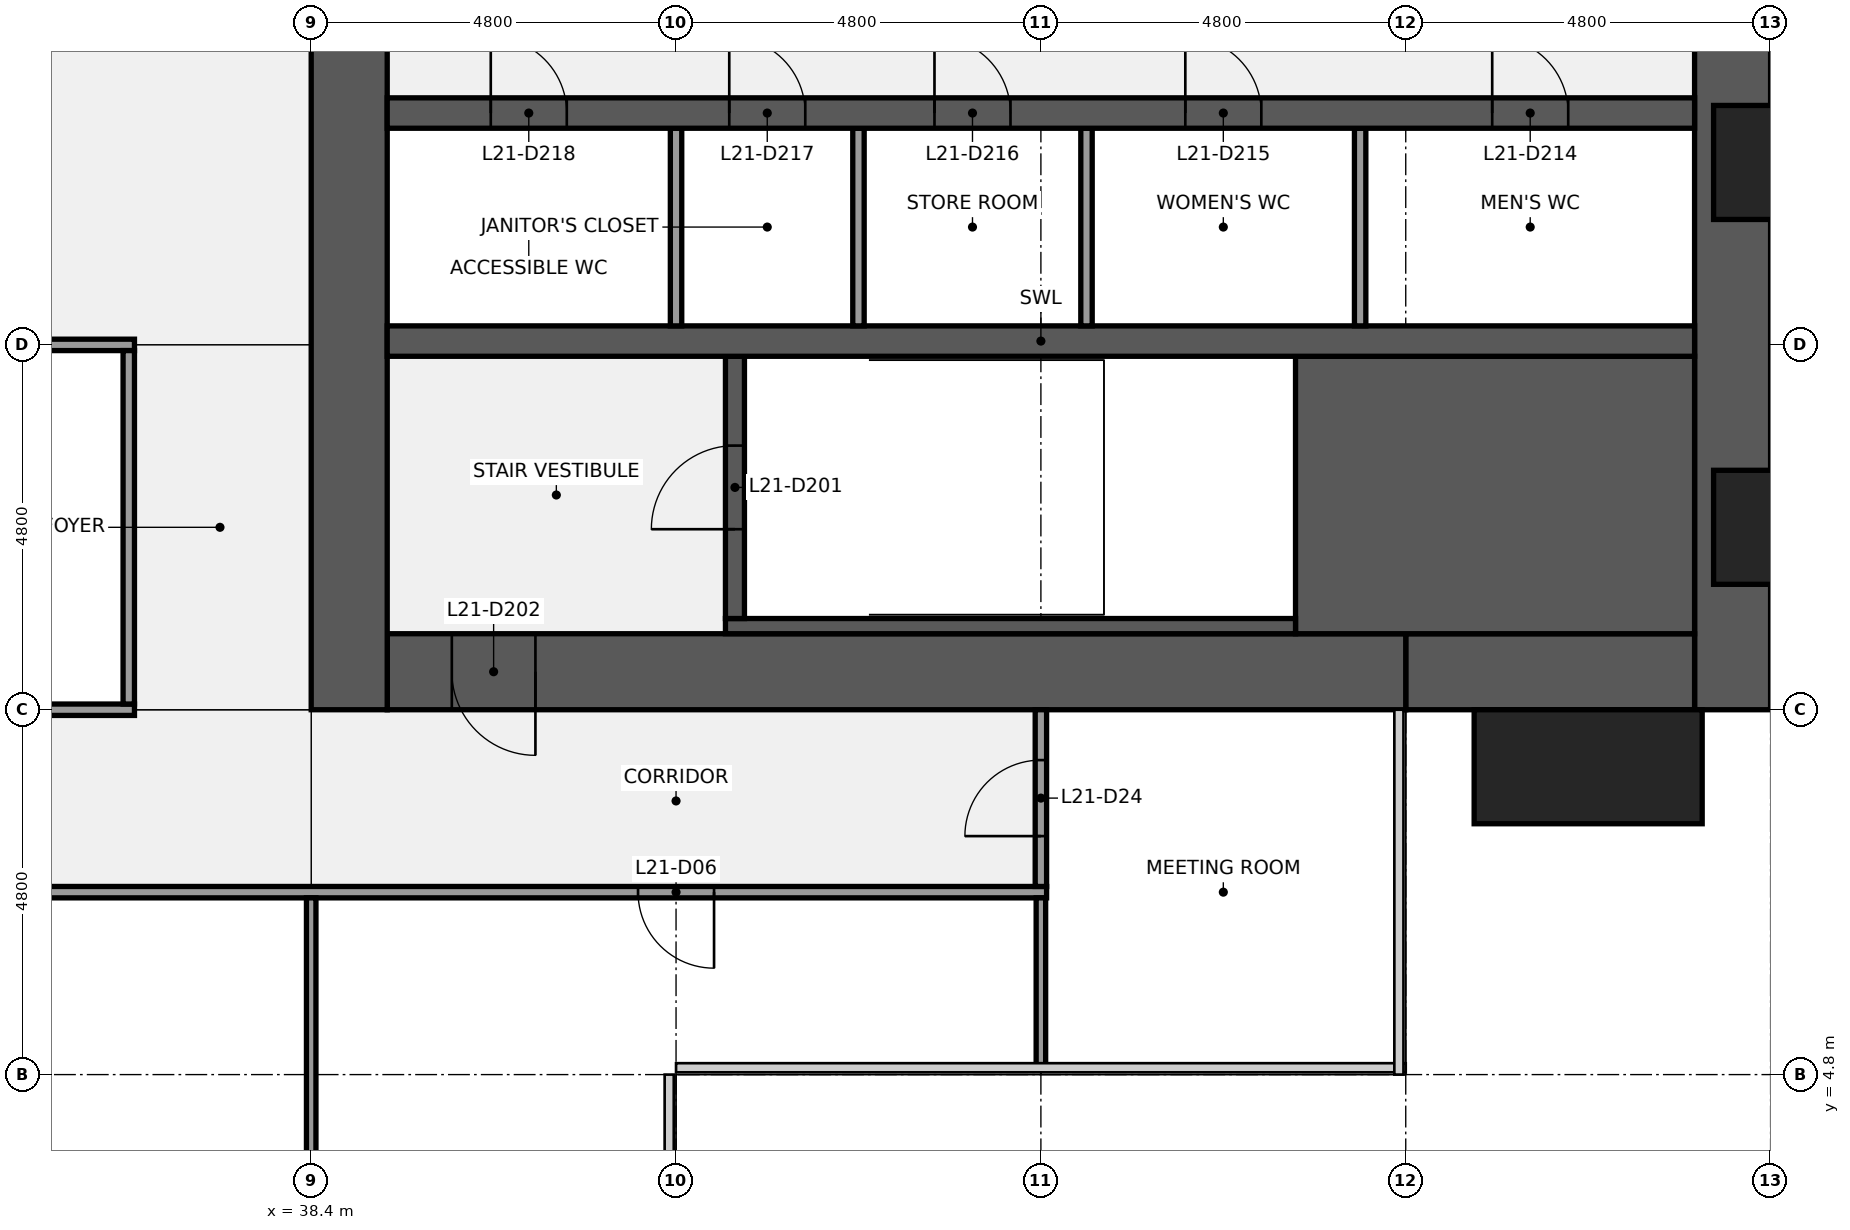
"""IFC4 building model, lengths in metres.
Left out: names, types, materials, properties, quantities, classifications, styles, units other than length and angle.
Written with IfcOpenShell. Run it as: python <this file> out.ifc"""

import sys

from ifc_helpers import new_model, si_unit, direction, frame, frame_2d, origin, origin_2d, place, context, subcontext, project, spatial, rectangle, extrude, element, fill, save


model = new_model("IFC4")
c1 = context("Model", 3, precision=1e-05, world=origin(), true_north=direction((0.0, 1.0)))
c2 = subcontext(c1, "Body", "Model", "MODEL_VIEW")
j1 = project(units=[si_unit("LENGTHUNIT", "METRE"), si_unit("PLANEANGLEUNIT", "RADIAN")], contexts=[c1])
p1 = place(None, origin())
s1 = spatial("IfcSite", under=j1, at=p1, CompositionType="ELEMENT")
p2 = place(p1, origin())
s2 = spatial("IfcBuilding", under=s1, at=p2, CompositionType="ELEMENT")
p3 = place(p2, frame((0.0, 0.0, 104.1)))
s3 = spatial("IfcBuildingStorey", under=s2, at=p3, CompositionType="ELEMENT", Elevation=104.1)
p4 = place(p3, frame((57.1, 38.4, 0.0), z_axis=(0.0, 0.0, 1.0), x_axis=(0.0, -1.0, 0.0)))
e1 = element("IfcWall", 1, at=p4, inside=s3, PredefinedType="SHEAR", context=c2, shape_type="SweptSolid", body=[
    extrude(rectangle(XDim=28.8, YDim=1.0, at=frame_2d((14.4, 0.0))), origin(), (0.0, 0.0, 1.0), 3.84),
])
p5 = place(p4, frame((18.45, 0.0, 0.9)))
e2 = element("IfcOpeningElement", 2, at=p5, cuts=e1, PredefinedType="OPENING", context=c2, shape_type="SweptSolid", body=[
    extrude(rectangle(XDim=1.5, YDim=1.5, at=frame_2d((0.75, 0.75))), frame((0.0, 0.51, 0.0), z_axis=(0.0, -1.0, 0.0), x_axis=(1.0, 0.0, 0.0)), (0.0, 0.0, 1.0), 1.02),
])
p6 = place(p4, frame((8.85, 0.0, 0.9)))
e3 = element("IfcOpeningElement", 3, at=p6, cuts=e1, PredefinedType="OPENING", context=c2, shape_type="SweptSolid", body=[
    extrude(rectangle(XDim=1.5, YDim=1.5, at=frame_2d((0.75, 0.75))), frame((0.0, 0.51, 0.0), z_axis=(0.0, -1.0, 0.0), x_axis=(1.0, 0.0, 0.0)), (0.0, 0.0, 1.0), 1.02),
])
p7 = place(p3, frame((56.6, 10.1, 0.0), z_axis=(0.0, 0.0, 1.0), x_axis=(-1.0, 0.0, 0.0)))
e4 = element("IfcWall", 4, at=p7, inside=s3, PredefinedType="SHEAR", context=c2, shape_type="SweptSolid", body=[
    extrude(rectangle(XDim=3.8, YDim=1.0, at=frame_2d((1.9, 0.0))), origin(), (0.0, 0.0, 1.0), 3.84),
])
p8 = place(p3, frame((52.8, 10.1, 0.0), z_axis=(0.0, 0.0, 1.0), x_axis=(-1.0, 0.0, 0.0)))
e5 = element("IfcWall", 5, at=p8, inside=s3, PredefinedType="SHEAR", context=c2, shape_type="SweptSolid", body=[
    extrude(rectangle(XDim=13.4, YDim=1.0, at=frame_2d((6.7, 0.0))), origin(), (0.0, 0.0, 1.0), 3.84),
])
p9 = place(p8, frame((11.45, 0.0, 0.0)))
e6 = element("IfcOpeningElement", 6, at=p9, cuts=e5, PredefinedType="OPENING", context=c2, shape_type="SweptSolid", body=[
    extrude(rectangle(XDim=1.1, YDim=2.1, at=frame_2d((0.55, 1.05))), frame((0.0, 0.51, 0.0), z_axis=(0.0, -1.0, 0.0), x_axis=(1.0, 0.0, 0.0)), (0.0, 0.0, 1.0), 1.02),
])
p10 = place(p3, frame((38.9, 9.6, 0.0), z_axis=(0.0, 0.0, 1.0), x_axis=(0.0, 1.0, 0.0)))
e7 = element("IfcWall", 7, at=p10, inside=s3, PredefinedType="SHEAR", context=c2, shape_type="SweptSolid", body=[
    extrude(rectangle(XDim=28.8, YDim=1.0, at=frame_2d((14.4, 0.0))), origin(), (0.0, 0.0, 1.0), 3.84),
])
p11 = place(p10, frame((8.7, 0.0, 0.0)))
e8 = element("IfcOpeningElement", 8, at=p11, cuts=e7, PredefinedType="OPENING", context=c2, shape_type="SweptSolid", body=[
    extrude(rectangle(XDim=1.8, YDim=2.1, at=frame_2d((0.9, 1.05))), frame((0.0, 0.51, 0.0), z_axis=(0.0, -1.0, 0.0), x_axis=(1.0, 0.0, 0.0)), (0.0, 0.0, 1.0), 1.02),
])
p12 = place(p10, frame((18.3, 0.0, 0.0)))
e9 = element("IfcOpeningElement", 9, at=p12, cuts=e7, PredefinedType="OPENING", context=c2, shape_type="SweptSolid", body=[
    extrude(rectangle(XDim=1.8, YDim=2.1, at=frame_2d((0.9, 1.05))), frame((0.0, 0.51, 0.0), z_axis=(0.0, -1.0, 0.0), x_axis=(1.0, 0.0, 0.0)), (0.0, 0.0, 1.0), 1.02),
])
p13 = place(p3, frame((51.35, 12.425, 0.0), z_axis=(0.0, 0.0, 1.0), x_axis=(1.0, 0.0, 0.0)))
e10 = element("IfcWall", 10, at=p13, inside=s3, PredefinedType="SHEAR", context=c2, shape_type="SweptSolid", body=[
    extrude(rectangle(XDim=5.25, YDim=3.65, at=frame_2d((2.625, 0.0))), origin(), (0.0, 0.0, 1.0), 3.84),
])
p14 = place(p3, frame((43.85, 10.7, 0.0), z_axis=(0.0, 0.0, 1.0), x_axis=(1.0, 0.0, 0.0)))
e11 = element("IfcWall", 11, at=p14, inside=s3, PredefinedType="SHEAR", context=c2, shape_type="SweptSolid", body=[
    extrude(rectangle(XDim=7.5, YDim=0.2, at=frame_2d((3.75, 0.0))), origin(), (0.0, 0.0, 1.0), 3.84),
])
p15 = place(p3, frame((43.975, 10.8, 0.0), z_axis=(0.0, 0.0, 1.0), x_axis=(0.0, 1.0, 0.0)))
e12 = element("IfcWall", 12, at=p15, inside=s3, PredefinedType="SHEAR", context=c2, shape_type="SweptSolid", body=[
    extrude(rectangle(XDim=3.45, YDim=0.25, at=frame_2d((1.725, 0.0))), origin(), (0.0, 0.0, 1.0), 3.84),
])
p16 = place(p15, frame((1.175, 0.0, 0.0)))
e13 = element("IfcOpeningElement", 13, at=p16, cuts=e12, PredefinedType="OPENING", context=c2, shape_type="SweptSolid", body=[
    extrude(rectangle(XDim=1.1, YDim=2.1, at=frame_2d((0.55, 1.05))), frame((0.0, 0.135, 0.0), z_axis=(0.0, -1.0, 0.0), x_axis=(1.0, 0.0, 0.0)), (0.0, 0.0, 1.0), 0.27),
])
p17 = place(p3, frame((39.4, 14.45, 0.0), z_axis=(0.0, 0.0, 1.0), x_axis=(1.0, 0.0, 0.0)))
e14 = element("IfcWall", 14, at=p17, inside=s3, PredefinedType="SHEAR", context=c2, shape_type="SweptSolid", body=[
    extrude(rectangle(XDim=17.2, YDim=0.4, at=frame_2d((8.6, 0.0))), origin(), (0.0, 0.0, 1.0), 3.84),
])
for number, where, z_axis, x_axis in (
    (15, (52.2, 14.65, 0.0), (0.0, 0.0, 1.0), (0.0, 1.0, 0.0)),
    (16, (48.6, 14.65, 0.0), (0.0, 0.0, 1.0), (0.0, 1.0, 0.0)),
    (17, (45.6, 14.65, 0.0), (0.0, 0.0, 1.0), (0.0, 1.0, 0.0)),
    (18, (43.2, 14.65, 0.0), (0.0, 0.0, 1.0), (0.0, 1.0, 0.0)),
):
    element("IfcWall", number, at=place(p3, frame(where, z_axis=z_axis, x_axis=x_axis)), inside=s3, PredefinedType="PARTITIONING", context=c2, shape_type="SweptSolid", body=[
        extrude(rectangle(XDim=2.6, YDim=0.15, at=frame_2d((1.3, 0.0))), origin(), (0.0, 0.0, 1.0), 3.84),
    ])
p18 = place(p3, frame((39.4, 17.45, 0.0), z_axis=(0.0, 0.0, 1.0), x_axis=(1.0, 0.0, 0.0)))
e19 = element("IfcWall", 19, at=p18, inside=s3, PredefinedType="SHEAR", context=c2, shape_type="SweptSolid", body=[
    extrude(rectangle(XDim=17.2, YDim=0.4, at=frame_2d((8.6, 0.0))), origin(), (0.0, 0.0, 1.0), 3.84),
])
p19 = place(p18, frame((14.538, 0.0, 0.0)))
e20 = element("IfcOpeningElement", 20, at=p19, cuts=e19, PredefinedType="OPENING", context=c2, shape_type="SweptSolid", body=[
    extrude(rectangle(XDim=1.0, YDim=2.1, at=frame_2d((0.5, 1.05))), frame((0.0, 0.21, 0.0), z_axis=(0.0, -1.0, 0.0), x_axis=(1.0, 0.0, 0.0)), (0.0, 0.0, 1.0), 0.42),
])
p20 = place(p18, frame((10.5, 0.0, 0.0)))
e21 = element("IfcOpeningElement", 21, at=p20, cuts=e19, PredefinedType="OPENING", context=c2, shape_type="SweptSolid", body=[
    extrude(rectangle(XDim=1.0, YDim=2.1, at=frame_2d((0.5, 1.05))), frame((0.0, 0.21, 0.0), z_axis=(0.0, -1.0, 0.0), x_axis=(1.0, 0.0, 0.0)), (0.0, 0.0, 1.0), 0.42),
])
p21 = place(p18, frame((7.2, 0.0, 0.0)))
e22 = element("IfcOpeningElement", 22, at=p21, cuts=e19, PredefinedType="OPENING", context=c2, shape_type="SweptSolid", body=[
    extrude(rectangle(XDim=1.0, YDim=2.1, at=frame_2d((0.5, 1.05))), frame((0.0, 0.21, 0.0), z_axis=(0.0, -1.0, 0.0), x_axis=(1.0, 0.0, 0.0)), (0.0, 0.0, 1.0), 0.42),
])
p22 = place(p18, frame((4.5, 0.0, 0.0)))
e23 = element("IfcOpeningElement", 23, at=p22, cuts=e19, PredefinedType="OPENING", context=c2, shape_type="SweptSolid", body=[
    extrude(rectangle(XDim=1.0, YDim=2.1, at=frame_2d((0.5, 1.05))), frame((0.0, 0.21, 0.0), z_axis=(0.0, -1.0, 0.0), x_axis=(1.0, 0.0, 0.0)), (0.0, 0.0, 1.0), 0.42),
])
p23 = place(p18, frame((1.363, 0.0, 0.0)))
e24 = element("IfcOpeningElement", 24, at=p23, cuts=e19, PredefinedType="OPENING", context=c2, shape_type="SweptSolid", body=[
    extrude(rectangle(XDim=1.0, YDim=2.1, at=frame_2d((0.5, 1.05))), frame((0.0, 0.21, 0.0), z_axis=(0.0, -1.0, 0.0), x_axis=(1.0, 0.0, 0.0)), (0.0, 0.0, 1.0), 0.42),
])
p24 = place(p3, frame((9.7, 7.2, 0.0), z_axis=(0.0, 0.0, 1.0), x_axis=(1.0, 0.0, 0.0)))
e25 = element("IfcWall", 25, at=p24, inside=s3, PredefinedType="PARTITIONING", context=c2, shape_type="SweptSolid", body=[
    extrude(rectangle(XDim=38.375, YDim=0.15, at=frame_2d((19.188, 0.0))), origin(), (0.0, 0.0, 1.0), 2.936),
])
p25 = place(p24, frame((4.25, 0.0, 0.0)))
e26 = element("IfcOpeningElement", 26, at=p25, cuts=e25, PredefinedType="OPENING", context=c2, shape_type="SweptSolid", body=[
    extrude(rectangle(XDim=1.0, YDim=2.1, at=frame_2d((0.5, 1.05))), frame((0.0, 0.085, 0.0), z_axis=(0.0, -1.0, 0.0), x_axis=(1.0, 0.0, 0.0)), (0.0, 0.0, 1.0), 0.17),
])
p26 = place(p24, frame((10.2, 0.0, 0.0)))
e27 = element("IfcOpeningElement", 27, at=p26, cuts=e25, PredefinedType="OPENING", context=c2, shape_type="SweptSolid", body=[
    extrude(rectangle(XDim=1.0, YDim=2.1, at=frame_2d((0.5, 1.05))), frame((0.0, 0.085, 0.0), z_axis=(0.0, -1.0, 0.0), x_axis=(1.0, 0.0, 0.0)), (0.0, 0.0, 1.0), 0.17),
])
p27 = place(p24, frame((13.8, 0.0, 0.0)))
e28 = element("IfcOpeningElement", 28, at=p27, cuts=e25, PredefinedType="OPENING", context=c2, shape_type="SweptSolid", body=[
    extrude(rectangle(XDim=1.0, YDim=2.1, at=frame_2d((0.5, 1.05))), frame((0.0, 0.085, 0.0), z_axis=(0.0, -1.0, 0.0), x_axis=(1.0, 0.0, 0.0)), (0.0, 0.0, 1.0), 0.17),
])
p28 = place(p24, frame((17.4, 0.0, 0.0)))
e29 = element("IfcOpeningElement", 29, at=p28, cuts=e25, PredefinedType="OPENING", context=c2, shape_type="SweptSolid", body=[
    extrude(rectangle(XDim=1.0, YDim=2.1, at=frame_2d((0.5, 1.05))), frame((0.0, 0.085, 0.0), z_axis=(0.0, -1.0, 0.0), x_axis=(1.0, 0.0, 0.0)), (0.0, 0.0, 1.0), 0.17),
])
p29 = place(p24, frame((23.4, 0.0, 0.0)))
e30 = element("IfcOpeningElement", 30, at=p29, cuts=e25, PredefinedType="OPENING", context=c2, shape_type="SweptSolid", body=[
    extrude(rectangle(XDim=1.0, YDim=2.1, at=frame_2d((0.5, 1.05))), frame((0.0, 0.085, 0.0), z_axis=(0.0, -1.0, 0.0), x_axis=(1.0, 0.0, 0.0)), (0.0, 0.0, 1.0), 0.17),
])
p30 = place(p24, frame((33.0, 0.0, 0.0)))
e31 = element("IfcOpeningElement", 31, at=p30, cuts=e25, PredefinedType="OPENING", context=c2, shape_type="SweptSolid", body=[
    extrude(rectangle(XDim=1.0, YDim=2.1, at=frame_2d((0.5, 1.05))), frame((0.0, 0.085, 0.0), z_axis=(0.0, -1.0, 0.0), x_axis=(1.0, 0.0, 0.0)), (0.0, 0.0, 1.0), 0.17),
])
p31 = place(p3, frame((21.525, 9.6, 0.0), z_axis=(0.0, 0.0, 1.0), x_axis=(1.0, 0.0, 0.0)))
e32 = element("IfcWall", 32, at=p31, inside=s3, PredefinedType="PARTITIONING", context=c2, shape_type="SweptSolid", body=[
    extrude(rectangle(XDim=14.55, YDim=0.15, at=frame_2d((7.275, 0.0))), origin(), (0.0, 0.0, 1.0), 2.936),
])
p32 = place(p31, frame((3.175, 0.0, 0.0)))
e33 = element("IfcOpeningElement", 33, at=p32, cuts=e32, PredefinedType="OPENING", context=c2, shape_type="SweptSolid", body=[
    extrude(rectangle(XDim=1.0, YDim=2.1, at=frame_2d((0.5, 1.05))), frame((0.0, 0.085, 0.0), z_axis=(0.0, -1.0, 0.0), x_axis=(1.0, 0.0, 0.0)), (0.0, 0.0, 1.0), 0.17),
])
p33 = place(p31, frame((10.375, 0.0, 0.0)))
e34 = element("IfcOpeningElement", 34, at=p33, cuts=e32, PredefinedType="OPENING", context=c2, shape_type="SweptSolid", body=[
    extrude(rectangle(XDim=1.0, YDim=2.1, at=frame_2d((0.5, 1.05))), frame((0.0, 0.085, 0.0), z_axis=(0.0, -1.0, 0.0), x_axis=(1.0, 0.0, 0.0)), (0.0, 0.0, 1.0), 0.17),
])
p34 = place(p3, frame((31.275, 14.4, 0.0), z_axis=(0.0, 0.0, 1.0), x_axis=(1.0, 0.0, 0.0)))
e35 = element("IfcWall", 35, at=p34, inside=s3, PredefinedType="PARTITIONING", context=c2, shape_type="SweptSolid", body=[
    extrude(rectangle(XDim=4.8, YDim=0.15, at=frame_2d((2.4, 0.0))), origin(), (0.0, 0.0, 1.0), 2.936),
])
p35 = place(p3, frame((36.0, 9.675, 0.0), z_axis=(0.0, 0.0, 1.0), x_axis=(0.0, 1.0, 0.0)))
e36 = element("IfcWall", 36, at=p35, inside=s3, PredefinedType="PARTITIONING", context=c2, shape_type="SweptSolid", body=[
    extrude(rectangle(XDim=4.65, YDim=0.15, at=frame_2d((2.325, 0.0))), origin(), (0.0, 0.0, 1.0), 2.936),
])
p36 = place(p3, frame((38.4, 0.6, 0.0), z_axis=(0.0, 0.0, 1.0), x_axis=(0.0, 1.0, 0.0)))
e37 = element("IfcWall", 37, at=p36, inside=s3, PredefinedType="PARTITIONING", context=c2, shape_type="SweptSolid", body=[
    extrude(rectangle(XDim=6.525, YDim=0.125, at=frame_2d((3.262, 0.0))), origin(), (0.0, 0.0, 1.0), 2.936),
])
p37 = place(p3, frame((48.0, 4.9, 0.0), z_axis=(0.0, 0.0, 1.0), x_axis=(0.0, 1.0, 0.0)))
e38 = element("IfcWall", 38, at=p37, inside=s3, PredefinedType="PARTITIONING", context=c2, shape_type="SweptSolid", body=[
    extrude(rectangle(XDim=2.225, YDim=0.125, at=frame_2d((1.113, 0.0))), origin(), (0.0, 0.0, 1.0), 2.936),
])
p38 = place(p3, frame((48.0, 7.275, 0.0), z_axis=(0.0, 0.0, 1.0), x_axis=(0.0, 1.0, 0.0)))
e39 = element("IfcWall", 39, at=p38, inside=s3, PredefinedType="PARTITIONING", context=c2, shape_type="SweptSolid", body=[
    extrude(rectangle(XDim=2.325, YDim=0.15, at=frame_2d((1.163, 0.0))), origin(), (0.0, 0.0, 1.0), 2.936),
])
p39 = place(p38, frame((0.663, 0.0, 0.0)))
e40 = element("IfcOpeningElement", 40, at=p39, cuts=e39, PredefinedType="OPENING", context=c2, shape_type="SweptSolid", body=[
    extrude(rectangle(XDim=1.0, YDim=2.1, at=frame_2d((0.5, 1.05))), frame((0.0, 0.085, 0.0), z_axis=(0.0, -1.0, 0.0), x_axis=(1.0, 0.0, 0.0)), (0.0, 0.0, 1.0), 0.17),
])
p40 = place(p3, frame((55.2, 8.85, 0.0), z_axis=(0.0, 0.0, 1.0), x_axis=(1.0, 0.0, 0.0)))
e41 = element("IfcColumn", 41, at=p40, inside=s3, PredefinedType="PILASTER", context=c2, shape_type="SweptSolid", body=[
    extrude(rectangle(XDim=3.0, YDim=1.5, at=origin_2d()), origin(), (0.0, 0.0, 1.0), 4.0),
])
p41 = place(p16, origin())
e42 = element("IfcDoor", 42, at=p41, inside=s3, OperationType="SINGLE_SWING_LEFT", PredefinedType="DOOR", context=c2, shape_type="SweptSolid", body=[
    extrude(rectangle(XDim=1.1, YDim=2.1, at=frame_2d((0.55, 1.05))), frame((0.0, 0.025, 0.0), z_axis=(0.0, -1.0, 0.0), x_axis=(1.0, 0.0, 0.0)), (0.0, 0.0, 1.0), 0.05),
])
fill(e13, e42)
p42 = place(p9, origin())
e43 = element("IfcDoor", 43, at=p42, inside=s3, OperationType="SINGLE_SWING_LEFT", PredefinedType="DOOR", context=c2, shape_type="SweptSolid", body=[
    extrude(rectangle(XDim=1.1, YDim=2.1, at=frame_2d((0.55, 1.05))), frame((0.0, 0.025, 0.0), z_axis=(0.0, -1.0, 0.0), x_axis=(1.0, 0.0, 0.0)), (0.0, 0.0, 1.0), 0.05),
])
fill(e6, e43)
p43 = place(p19, origin())
e44 = element("IfcDoor", 44, at=p43, inside=s3, OperationType="SINGLE_SWING_LEFT", PredefinedType="DOOR", context=c2, shape_type="SweptSolid", body=[
    extrude(rectangle(XDim=1.0, YDim=2.1, at=frame_2d((0.5, 1.05))), frame((0.0, 0.025, 0.0), z_axis=(0.0, -1.0, 0.0), x_axis=(1.0, 0.0, 0.0)), (0.0, 0.0, 1.0), 0.05),
])
fill(e20, e44)
p44 = place(p20, origin())
e45 = element("IfcDoor", 45, at=p44, inside=s3, OperationType="SINGLE_SWING_LEFT", PredefinedType="DOOR", context=c2, shape_type="SweptSolid", body=[
    extrude(rectangle(XDim=1.0, YDim=2.1, at=frame_2d((0.5, 1.05))), frame((0.0, 0.025, 0.0), z_axis=(0.0, -1.0, 0.0), x_axis=(1.0, 0.0, 0.0)), (0.0, 0.0, 1.0), 0.05),
])
fill(e21, e45)
p45 = place(p21, origin())
e46 = element("IfcDoor", 46, at=p45, inside=s3, OperationType="SINGLE_SWING_LEFT", PredefinedType="DOOR", context=c2, shape_type="SweptSolid", body=[
    extrude(rectangle(XDim=1.0, YDim=2.1, at=frame_2d((0.5, 1.05))), frame((0.0, 0.025, 0.0), z_axis=(0.0, -1.0, 0.0), x_axis=(1.0, 0.0, 0.0)), (0.0, 0.0, 1.0), 0.05),
])
fill(e22, e46)
p46 = place(p22, origin())
e47 = element("IfcDoor", 47, at=p46, inside=s3, OperationType="SINGLE_SWING_LEFT", PredefinedType="DOOR", context=c2, shape_type="SweptSolid", body=[
    extrude(rectangle(XDim=1.0, YDim=2.1, at=frame_2d((0.5, 1.05))), frame((0.0, 0.025, 0.0), z_axis=(0.0, -1.0, 0.0), x_axis=(1.0, 0.0, 0.0)), (0.0, 0.0, 1.0), 0.05),
])
fill(e23, e47)
p47 = place(p23, origin())
e48 = element("IfcDoor", 48, at=p47, inside=s3, OperationType="SINGLE_SWING_LEFT", PredefinedType="DOOR", context=c2, shape_type="SweptSolid", body=[
    extrude(rectangle(XDim=1.0, YDim=2.1, at=frame_2d((0.5, 1.05))), frame((0.0, 0.025, 0.0), z_axis=(0.0, -1.0, 0.0), x_axis=(1.0, 0.0, 0.0)), (0.0, 0.0, 1.0), 0.05),
])
fill(e24, e48)
p48 = place(p30, origin())
e49 = element("IfcDoor", 49, at=p48, inside=s3, OperationType="SINGLE_SWING_RIGHT", PredefinedType="DOOR", context=c2, shape_type="SweptSolid", body=[
    extrude(rectangle(XDim=1.0, YDim=2.1, at=frame_2d((0.5, 1.05))), frame((0.0, 0.025, 0.0), z_axis=(0.0, -1.0, 0.0), x_axis=(1.0, 0.0, 0.0)), (0.0, 0.0, 1.0), 0.05),
])
fill(e31, e49)
p49 = place(p39, origin())
e50 = element("IfcDoor", 50, at=p49, inside=s3, OperationType="SINGLE_SWING_LEFT", PredefinedType="DOOR", context=c2, shape_type="SweptSolid", body=[
    extrude(rectangle(XDim=1.0, YDim=2.1, at=frame_2d((0.5, 1.05))), frame((0.0, 0.025, 0.0), z_axis=(0.0, -1.0, 0.0), x_axis=(1.0, 0.0, 0.0)), (0.0, 0.0, 1.0), 0.05),
])
fill(e40, e50)
save(model, sys.argv[1])
